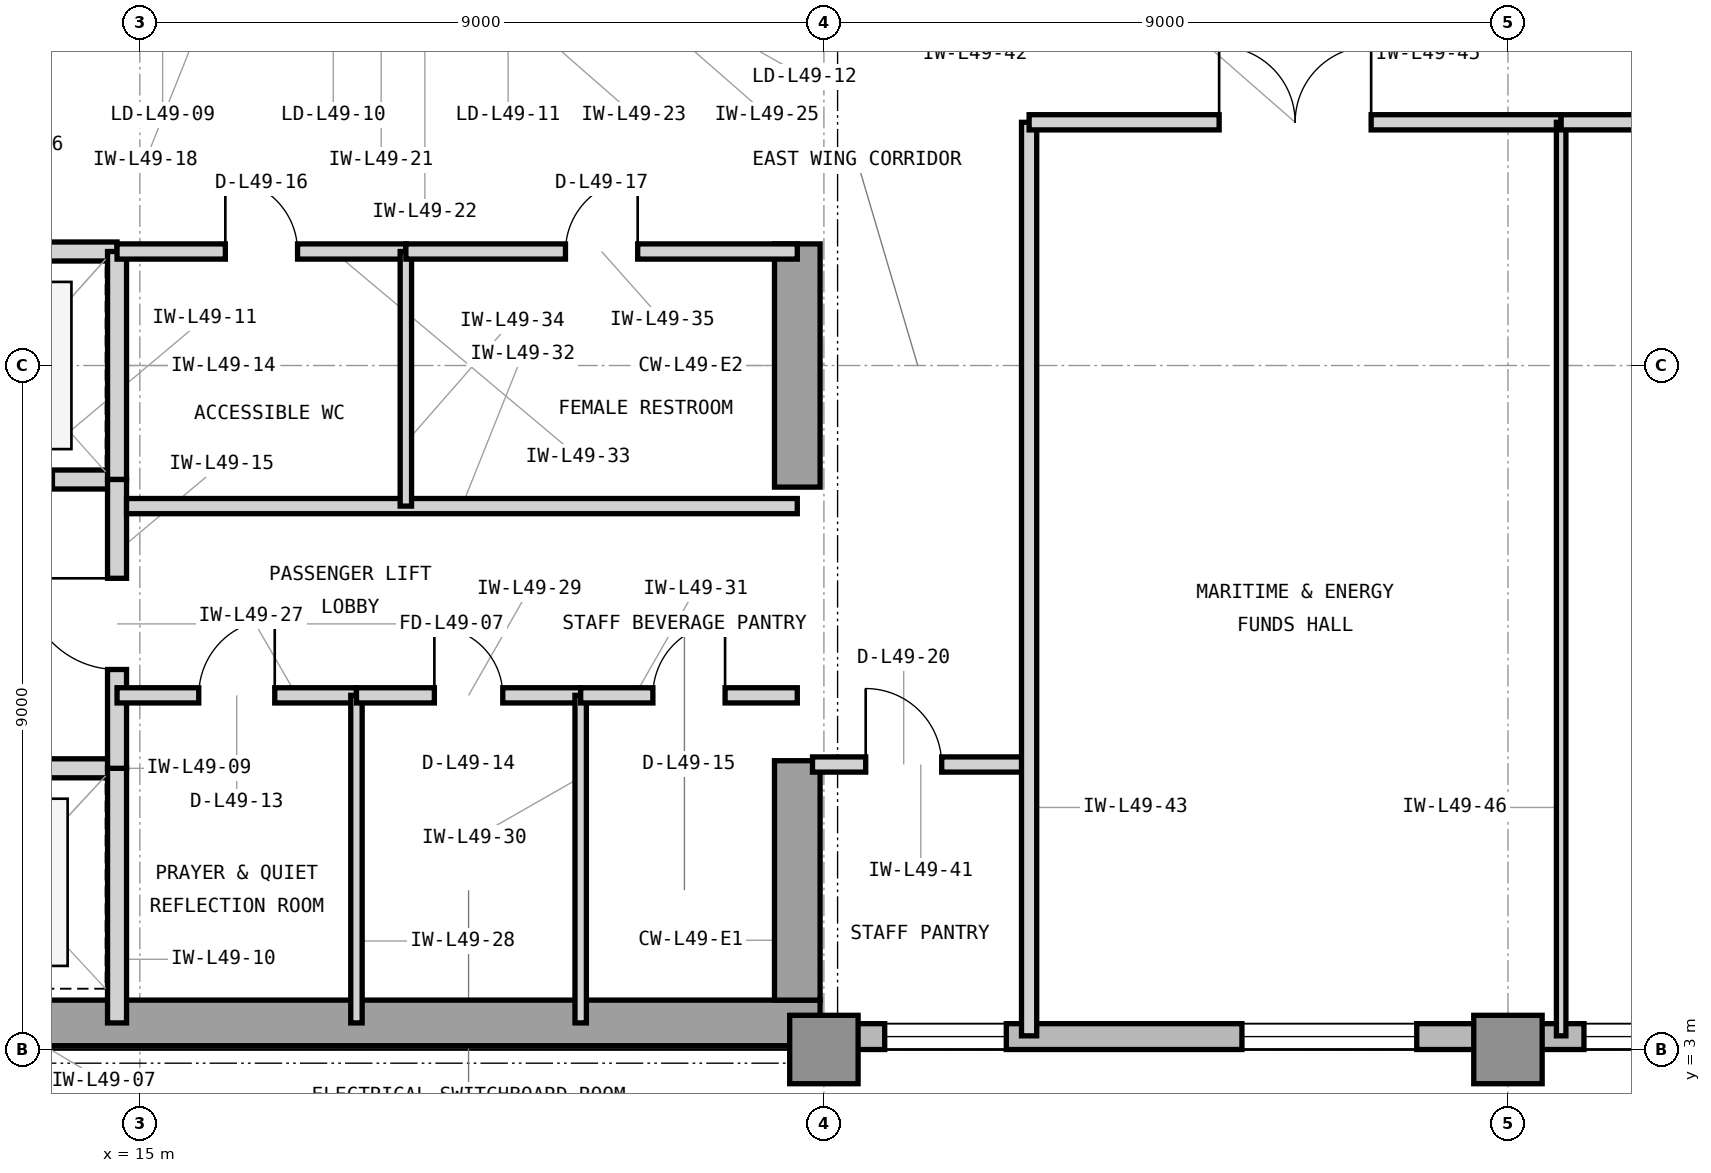
"""IFC4 building model, lengths in metres.
Left out: names, types, materials, properties, quantities, classifications, styles, units other than length and angle.
Written with IfcOpenShell. Run it as: python <this file> out.ifc"""

import sys

from ifc_helpers import new_model, si_unit, direction, frame, frame_2d, origin, origin_2d, place, context, subcontext, project, spatial, rectangle, extrude, element, fill, save


model = new_model("IFC4")
c1 = context("Model", 3, precision=1e-05, world=origin(), true_north=direction((0.0, 1.0)))
c2 = subcontext(c1, "Body", "Model", "MODEL_VIEW")
j1 = project(units=[si_unit("LENGTHUNIT", "METRE"), si_unit("PLANEANGLEUNIT", "RADIAN")], contexts=[c1])
p1 = place(None, origin())
s1 = spatial("IfcSite", under=j1, at=p1, CompositionType="ELEMENT")
p2 = place(p1, origin())
s2 = spatial("IfcBuilding", under=s1, at=p2, CompositionType="ELEMENT")
p3 = place(p2, frame((0.0, 0.0, 203.4)))
s3 = spatial("IfcBuildingStorey", under=s2, at=p3, CompositionType="ELEMENT", Elevation=203.4)
p4 = place(p3, frame((7.475, 3.35, 0.0), z_axis=(0.0, 0.0, 1.0), x_axis=(1.0, 0.0, 0.0)))
e1 = element("IfcWall", 1, at=p4, inside=s3, PredefinedType="SHEAR", context=c2, shape_type="SweptSolid", body=[
    extrude(rectangle(XDim=16.475, YDim=0.6, at=frame_2d((8.237, 0.0))), origin(), (0.0, 0.0, 1.0), 3.9),
])
p5 = place(p3, frame((23.65, 3.65, 0.0), z_axis=(0.0, 0.0, 1.0), x_axis=(0.0, 1.0, 0.0)))
e2 = element("IfcWall", 2, at=p5, inside=s3, PredefinedType="SHEAR", context=c2, shape_type="SweptSolid", body=[
    extrude(rectangle(XDim=3.15, YDim=0.6, at=frame_2d((1.575, 0.0))), origin(), (0.0, 0.0, 1.0), 3.9),
])
p6 = place(p3, frame((23.65, 10.4, 0.0), z_axis=(0.0, 0.0, 1.0), x_axis=(0.0, 1.0, 0.0)))
e3 = element("IfcWall", 3, at=p6, inside=s3, PredefinedType="SHEAR", context=c2, shape_type="SweptSolid", body=[
    extrude(rectangle(XDim=3.2, YDim=0.6, at=frame_2d((1.6, 0.0))), origin(), (0.0, 0.0, 1.0), 3.9),
])
for number, where, z_axis, x_axis in (
    (4, (24.0, 3.0, 0.0), (0.0, 0.0, 1.0), (1.0, 0.0, 0.0)),
    (5, (33.0, 3.0, 0.0), (0.0, 0.0, 1.0), (1.0, 0.0, 0.0)),
):
    element("IfcColumn", number, at=place(p3, frame(where, z_axis=z_axis, x_axis=x_axis)), inside=s3, PredefinedType="COLUMN", context=c2, shape_type="SweptSolid", body=[
        extrude(rectangle(XDim=0.9, YDim=0.9, at=origin_2d()), origin(), (0.0, 0.0, 1.0), 3.9),
    ])
p7 = place(p3, frame((23.9, 3.17, 0.0), z_axis=(0.0, 0.0, 1.0), x_axis=(1.0, 0.0, 0.0)))
e6 = element("IfcWall", 6, at=p7, inside=s3, PredefinedType="STANDARD", context=c2, shape_type="SweptSolid", body=[
    extrude(rectangle(XDim=31.5, YDim=0.34, at=frame_2d((15.75, 0.0))), origin(), (0.0, 0.0, 1.0), 3.7),
])
p8 = place(p7, frame((5.6, 0.0, 0.9)))
e7 = element("IfcOpeningElement", 7, at=p8, cuts=e6, PredefinedType="OPENING", context=c2, shape_type="SweptSolid", body=[
    extrude(rectangle(XDim=2.3, YDim=2.2, at=frame_2d((1.15, 1.1))), frame((0.0, 0.18, 0.0), z_axis=(0.0, -1.0, 0.0), x_axis=(1.0, 0.0, 0.0)), (0.0, 0.0, 1.0), 0.36),
])
p9 = place(p7, frame((10.1, 0.0, 0.9)))
e8 = element("IfcOpeningElement", 8, at=p9, cuts=e6, PredefinedType="OPENING", context=c2, shape_type="SweptSolid", body=[
    extrude(rectangle(XDim=2.3, YDim=2.2, at=frame_2d((1.15, 1.1))), frame((0.0, 0.18, 0.0), z_axis=(0.0, -1.0, 0.0), x_axis=(1.0, 0.0, 0.0)), (0.0, 0.0, 1.0), 0.36),
])
p10 = place(p7, frame((19.1, 0.0, 0.9)))
e9 = element("IfcOpeningElement", 9, at=p10, cuts=e6, PredefinedType="OPENING", context=c2, shape_type="SweptSolid", body=[
    extrude(rectangle(XDim=2.3, YDim=2.2, at=frame_2d((1.15, 1.1))), frame((0.0, 0.18, 0.0), z_axis=(0.0, -1.0, 0.0), x_axis=(1.0, 0.0, 0.0)), (0.0, 0.0, 1.0), 0.36),
])
p11 = place(p7, frame((0.9, 0.0, 0.9)))
e10 = element("IfcOpeningElement", 10, at=p11, cuts=e6, PredefinedType="OPENING", context=c2, shape_type="SweptSolid", body=[
    extrude(rectangle(XDim=1.6, YDim=2.2, at=frame_2d((0.8, 1.1))), frame((0.0, 0.18, 0.0), z_axis=(0.0, -1.0, 0.0), x_axis=(1.0, 0.0, 0.0)), (0.0, 0.0, 1.0), 0.36),
])
p12 = place(p3, frame((11.82, 6.7, 0.0), z_axis=(0.0, 0.0, 1.0), x_axis=(1.0, 0.0, 0.0)))
e11 = element("IfcWall", 11, at=p12, inside=s3, PredefinedType="PARTITIONING", context=c2, shape_type="SweptSolid", body=[
    extrude(rectangle(XDim=2.88, YDim=0.25, at=frame_2d((1.44, 0.0))), origin(), (0.0, 0.0, 1.0), 3.283),
])
p13 = place(p12, frame((0.85, 0.0, 0.0)))
e12 = element("IfcOpeningElement", 12, at=p13, cuts=e11, PredefinedType="OPENING", context=c2, shape_type="SweptSolid", body=[
    extrude(rectangle(XDim=1.1, YDim=2.25, at=frame_2d((0.55, 1.125))), frame((0.0, 0.135, 0.0), z_axis=(0.0, -1.0, 0.0), x_axis=(1.0, 0.0, 0.0)), (0.0, 0.0, 1.0), 0.27),
])
p14 = place(p3, frame((14.7, 3.35, 0.0), z_axis=(0.0, 0.0, 1.0), x_axis=(0.0, 1.0, 0.0)))
e13 = element("IfcWall", 13, at=p14, inside=s3, PredefinedType="PARTITIONING", context=c2, shape_type="SweptSolid", body=[
    extrude(rectangle(XDim=3.35, YDim=0.25, at=frame_2d((1.675, 0.0))), origin(), (0.0, 0.0, 1.0), 3.69),
])
p15 = place(p3, frame((11.95, 10.5, 0.0), z_axis=(0.0, 0.0, 1.0), x_axis=(1.0, 0.0, 0.0)))
e14 = element("IfcWall", 14, at=p15, inside=s3, PredefinedType="PARTITIONING", context=c2, shape_type="SweptSolid", body=[
    extrude(rectangle(XDim=2.75, YDim=0.25, at=frame_2d((1.375, 0.0))), origin(), (0.0, 0.0, 1.0), 3.283),
])
p16 = place(p15, frame((0.8, 0.0, 0.0)))
e15 = element("IfcOpeningElement", 15, at=p16, cuts=e14, PredefinedType="OPENING", context=c2, shape_type="SweptSolid", body=[
    extrude(rectangle(XDim=1.1, YDim=2.25, at=frame_2d((0.55, 1.125))), frame((0.0, 0.135, 0.0), z_axis=(0.0, -1.0, 0.0), x_axis=(1.0, 0.0, 0.0)), (0.0, 0.0, 1.0), 0.27),
])
p17 = place(p3, frame((11.95, 13.5, 0.0), z_axis=(0.0, 0.0, 1.0), x_axis=(1.0, 0.0, 0.0)))
e16 = element("IfcWall", 16, at=p17, inside=s3, PredefinedType="PARTITIONING", context=c2, shape_type="SweptSolid", body=[
    extrude(rectangle(XDim=2.75, YDim=0.25, at=frame_2d((1.375, 0.0))), origin(), (0.0, 0.0, 1.0), 3.283),
])
p18 = place(p3, frame((14.7, 10.5, 0.0), z_axis=(0.0, 0.0, 1.0), x_axis=(0.0, 1.0, 0.0)))
e17 = element("IfcWall", 17, at=p18, inside=s3, PredefinedType="PARTITIONING", context=c2, shape_type="SweptSolid", body=[
    extrude(rectangle(XDim=3.0, YDim=0.25, at=frame_2d((1.5, 0.0))), origin(), (0.0, 0.0, 1.0), 3.69),
])
p19 = place(p3, frame((14.7, 6.7, 0.0), z_axis=(0.0, 0.0, 1.0), x_axis=(0.0, 1.0, 0.0)))
e18 = element("IfcWall", 18, at=p19, inside=s3, PredefinedType="PARTITIONING", context=c2, shape_type="SweptSolid", body=[
    extrude(rectangle(XDim=3.8, YDim=0.25, at=frame_2d((1.9, 0.0))), origin(), (0.0, 0.0, 1.0), 3.69),
])
p20 = place(p19, frame((1.3, 0.0, 0.0)))
e19 = element("IfcOpeningElement", 19, at=p20, cuts=e18, PredefinedType="OPENING", context=c2, shape_type="SweptSolid", body=[
    extrude(rectangle(XDim=1.2, YDim=2.2, at=frame_2d((0.6, 1.1))), frame((0.0, 0.135, 0.0), z_axis=(0.0, -1.0, 0.0), x_axis=(1.0, 0.0, 0.0)), (0.0, 0.0, 1.0), 0.27),
])
p21 = place(p3, frame((14.7, 7.66, 0.0), z_axis=(0.0, 0.0, 1.0), x_axis=(1.0, 0.0, 0.0)))
e20 = element("IfcWall", 20, at=p21, inside=s3, PredefinedType="PARTITIONING", context=c2, shape_type="SweptSolid", body=[
    extrude(rectangle(XDim=3.15, YDim=0.2, at=frame_2d((1.575, 0.0))), origin(), (0.0, 0.0, 1.0), 3.69),
])
p22 = place(p21, frame((1.075, 0.0, 0.0)))
e21 = element("IfcOpeningElement", 21, at=p22, cuts=e20, PredefinedType="OPENING", context=c2, shape_type="SweptSolid", body=[
    extrude(rectangle(XDim=1.0, YDim=2.15, at=frame_2d((0.5, 1.075))), frame((0.0, 0.11, 0.0), z_axis=(0.0, -1.0, 0.0), x_axis=(1.0, 0.0, 0.0)), (0.0, 0.0, 1.0), 0.22),
])
p23 = place(p3, frame((17.85, 3.35, 0.0), z_axis=(0.0, 0.0, 1.0), x_axis=(0.0, 1.0, 0.0)))
e22 = element("IfcWall", 22, at=p23, inside=s3, PredefinedType="PARTITIONING", context=c2, shape_type="SweptSolid", body=[
    extrude(rectangle(XDim=4.31, YDim=0.15, at=frame_2d((2.155, 0.0))), origin(), (0.0, 0.0, 1.0), 3.69),
])
p24 = place(p3, frame((17.85, 7.66, 0.0), z_axis=(0.0, 0.0, 1.0), x_axis=(1.0, 0.0, 0.0)))
e23 = element("IfcWall", 23, at=p24, inside=s3, PredefinedType="PARTITIONING", context=c2, shape_type="SweptSolid", body=[
    extrude(rectangle(XDim=2.95, YDim=0.2, at=frame_2d((1.475, 0.0))), origin(), (0.0, 0.0, 1.0), 3.69),
])
p25 = place(p24, frame((1.025, 0.0, 0.0)))
e24 = element("IfcOpeningElement", 24, at=p25, cuts=e23, PredefinedType="OPENING", context=c2, shape_type="SweptSolid", body=[
    extrude(rectangle(XDim=0.9, YDim=2.1, at=frame_2d((0.45, 1.05))), frame((0.0, 0.11, 0.0), z_axis=(0.0, -1.0, 0.0), x_axis=(1.0, 0.0, 0.0)), (0.0, 0.0, 1.0), 0.22),
])
p26 = place(p3, frame((20.8, 3.35, 0.0), z_axis=(0.0, 0.0, 1.0), x_axis=(0.0, 1.0, 0.0)))
e25 = element("IfcWall", 25, at=p26, inside=s3, PredefinedType="PARTITIONING", context=c2, shape_type="SweptSolid", body=[
    extrude(rectangle(XDim=4.31, YDim=0.15, at=frame_2d((2.155, 0.0))), origin(), (0.0, 0.0, 1.0), 3.69),
])
p27 = place(p3, frame((20.8, 7.66, 0.0), z_axis=(0.0, 0.0, 1.0), x_axis=(1.0, 0.0, 0.0)))
e26 = element("IfcWall", 26, at=p27, inside=s3, PredefinedType="PARTITIONING", context=c2, shape_type="SweptSolid", body=[
    extrude(rectangle(XDim=2.85, YDim=0.2, at=frame_2d((1.425, 0.0))), origin(), (0.0, 0.0, 1.0), 3.69),
])
p28 = place(p27, frame((0.95, 0.0, 0.0)))
e27 = element("IfcOpeningElement", 27, at=p28, cuts=e26, PredefinedType="OPENING", context=c2, shape_type="SweptSolid", body=[
    extrude(rectangle(XDim=0.95, YDim=2.1, at=frame_2d((0.475, 1.05))), frame((0.0, 0.11, 0.0), z_axis=(0.0, -1.0, 0.0), x_axis=(1.0, 0.0, 0.0)), (0.0, 0.0, 1.0), 0.22),
])
p29 = place(p3, frame((14.825, 10.15, 0.0), z_axis=(0.0, 0.0, 1.0), x_axis=(1.0, 0.0, 0.0)))
e28 = element("IfcWall", 28, at=p29, inside=s3, PredefinedType="PARTITIONING", context=c2, shape_type="SweptSolid", body=[
    extrude(rectangle(XDim=8.825, YDim=0.2, at=frame_2d((4.413, 0.0))), origin(), (0.0, 0.0, 1.0), 3.69),
])
p30 = place(p3, frame((14.7, 13.5, 0.0), z_axis=(0.0, 0.0, 1.0), x_axis=(1.0, 0.0, 0.0)))
e29 = element("IfcWall", 29, at=p30, inside=s3, PredefinedType="PARTITIONING", context=c2, shape_type="SweptSolid", body=[
    extrude(rectangle(XDim=3.8, YDim=0.2, at=frame_2d((1.9, 0.0))), origin(), (0.0, 0.0, 1.0), 3.283),
])
p31 = place(p30, frame((1.425, 0.0, 0.0)))
e30 = element("IfcOpeningElement", 30, at=p31, cuts=e29, PredefinedType="OPENING", context=c2, shape_type="SweptSolid", body=[
    extrude(rectangle(XDim=0.95, YDim=2.1, at=frame_2d((0.475, 1.05))), frame((0.0, 0.11, 0.0), z_axis=(0.0, -1.0, 0.0), x_axis=(1.0, 0.0, 0.0)), (0.0, 0.0, 1.0), 0.22),
])
p32 = place(p3, frame((18.5, 10.15, 0.0), z_axis=(0.0, 0.0, 1.0), x_axis=(0.0, 1.0, 0.0)))
e31 = element("IfcWall", 31, at=p32, inside=s3, PredefinedType="PARTITIONING", context=c2, shape_type="SweptSolid", body=[
    extrude(rectangle(XDim=3.35, YDim=0.15, at=frame_2d((1.675, 0.0))), origin(), (0.0, 0.0, 1.0), 3.69),
])
p33 = place(p3, frame((18.5, 13.5, 0.0), z_axis=(0.0, 0.0, 1.0), x_axis=(1.0, 0.0, 0.0)))
e32 = element("IfcWall", 32, at=p33, inside=s3, PredefinedType="PARTITIONING", context=c2, shape_type="SweptSolid", body=[
    extrude(rectangle(XDim=5.15, YDim=0.2, at=frame_2d((2.575, 0.0))), origin(), (0.0, 0.0, 1.0), 3.283),
])
p34 = place(p33, frame((2.1, 0.0, 0.0)))
e33 = element("IfcOpeningElement", 33, at=p34, cuts=e32, PredefinedType="OPENING", context=c2, shape_type="SweptSolid", body=[
    extrude(rectangle(XDim=0.95, YDim=2.1, at=frame_2d((0.475, 1.05))), frame((0.0, 0.11, 0.0), z_axis=(0.0, -1.0, 0.0), x_axis=(1.0, 0.0, 0.0)), (0.0, 0.0, 1.0), 0.22),
])
p35 = place(p3, frame((23.85, 6.75, 0.0), z_axis=(0.0, 0.0, 1.0), x_axis=(1.0, 0.0, 0.0)))
e34 = element("IfcWall", 34, at=p35, inside=s3, PredefinedType="PARTITIONING", context=c2, shape_type="SweptSolid", body=[
    extrude(rectangle(XDim=2.85, YDim=0.2, at=frame_2d((1.425, 0.0))), origin(), (0.0, 0.0, 1.0), 3.69),
])
p36 = place(p35, frame((0.7, 0.0, 0.0)))
e35 = element("IfcOpeningElement", 35, at=p36, cuts=e34, PredefinedType="OPENING", context=c2, shape_type="SweptSolid", body=[
    extrude(rectangle(XDim=1.0, YDim=2.15, at=frame_2d((0.5, 1.075))), frame((0.0, 0.11, 0.0), z_axis=(0.0, -1.0, 0.0), x_axis=(1.0, 0.0, 0.0)), (0.0, 0.0, 1.0), 0.22),
])
p37 = place(p3, frame((26.7, 3.18, 0.0), z_axis=(0.0, 0.0, 1.0), x_axis=(0.0, 1.0, 0.0)))
e36 = element("IfcWall", 36, at=p37, inside=s3, PredefinedType="PARTITIONING", context=c2, shape_type="SweptSolid", body=[
    extrude(rectangle(XDim=12.02, YDim=0.2, at=frame_2d((6.01, 0.0))), origin(), (0.0, 0.0, 1.0), 3.69),
])
p38 = place(p3, frame((26.7, 15.2, 0.0), z_axis=(0.0, 0.0, 1.0), x_axis=(1.0, 0.0, 0.0)))
e37 = element("IfcWall", 37, at=p38, inside=s3, PredefinedType="PARTITIONING", context=c2, shape_type="SweptSolid", body=[
    extrude(rectangle(XDim=7.0, YDim=0.2, at=frame_2d((3.5, 0.0))), origin(), (0.0, 0.0, 1.0), 3.69),
])
p39 = place(p38, frame((2.5, 0.0, 0.0)))
e38 = element("IfcOpeningElement", 38, at=p39, cuts=e37, PredefinedType="OPENING", context=c2, shape_type="SweptSolid", body=[
    extrude(rectangle(XDim=2.0, YDim=2.5, at=frame_2d((1.0, 1.25))), frame((0.0, 0.11, 0.0), z_axis=(0.0, -1.0, 0.0), x_axis=(1.0, 0.0, 0.0)), (0.0, 0.0, 1.0), 0.22),
])
p40 = place(p3, frame((33.7, 3.18, 0.0), z_axis=(0.0, 0.0, 1.0), x_axis=(0.0, 1.0, 0.0)))
e39 = element("IfcWall", 39, at=p40, inside=s3, PredefinedType="PARTITIONING", context=c2, shape_type="SweptSolid", body=[
    extrude(rectangle(XDim=12.02, YDim=0.125, at=frame_2d((6.01, 0.0))), origin(), (0.0, 0.0, 1.0), 3.69),
])
p41 = place(p3, frame((33.7, 15.2, 0.0), z_axis=(0.0, 0.0, 1.0), x_axis=(1.0, 0.0, 0.0)))
e40 = element("IfcWall", 40, at=p41, inside=s3, PredefinedType="PARTITIONING", context=c2, shape_type="SweptSolid", body=[
    extrude(rectangle(XDim=7.0, YDim=0.2, at=frame_2d((3.5, 0.0))), origin(), (0.0, 0.0, 1.0), 3.69),
])
p42 = place(p41, frame((3.0, 0.0, 0.0)))
e41 = element("IfcOpeningElement", 41, at=p42, cuts=e40, PredefinedType="OPENING", context=c2, shape_type="SweptSolid", body=[
    extrude(rectangle(XDim=1.0, YDim=2.15, at=frame_2d((0.5, 1.075))), frame((0.0, 0.11, 0.0), z_axis=(0.0, -1.0, 0.0), x_axis=(1.0, 0.0, 0.0)), (0.0, 0.0, 1.0), 0.22),
])
p43 = place(p8, origin())
e42 = element("IfcWindow", 42, at=p43, inside=s3, PartitioningType="SINGLE_PANEL", PredefinedType="WINDOW", context=c2, shape_type="SweptSolid", body=[
    extrude(rectangle(XDim=2.3, YDim=2.2, at=frame_2d((1.15, 1.1))), frame((0.0, 0.11, 0.0), z_axis=(0.0, -1.0, 0.0), x_axis=(1.0, 0.0, 0.0)), (0.0, 0.0, 1.0), 0.06),
])
fill(e7, e42)
p44 = place(p9, origin())
e43 = element("IfcWindow", 43, at=p44, inside=s3, PartitioningType="SINGLE_PANEL", PredefinedType="WINDOW", context=c2, shape_type="SweptSolid", body=[
    extrude(rectangle(XDim=2.3, YDim=2.2, at=frame_2d((1.15, 1.1))), frame((0.0, 0.11, 0.0), z_axis=(0.0, -1.0, 0.0), x_axis=(1.0, 0.0, 0.0)), (0.0, 0.0, 1.0), 0.06),
])
fill(e8, e43)
p45 = place(p20, origin())
e44 = element("IfcDoor", 44, at=p45, inside=s3, OperationType="SINGLE_SWING_RIGHT", PredefinedType="DOOR", context=c2, shape_type="SweptSolid", body=[
    extrude(rectangle(XDim=1.2, YDim=2.2, at=frame_2d((0.6, 1.1))), frame((0.0, 0.025, 0.0), z_axis=(0.0, -1.0, 0.0), x_axis=(1.0, 0.0, 0.0)), (0.0, 0.0, 1.0), 0.05),
])
fill(e19, e44)
p46 = place(p22, origin())
e45 = element("IfcDoor", 45, at=p46, inside=s3, OperationType="SINGLE_SWING_RIGHT", PredefinedType="DOOR", context=c2, shape_type="SweptSolid", body=[
    extrude(rectangle(XDim=1.0, YDim=2.15, at=frame_2d((0.5, 1.075))), frame((0.0, 0.025, 0.0), z_axis=(0.0, -1.0, 0.0), x_axis=(1.0, 0.0, 0.0)), (0.0, 0.0, 1.0), 0.05),
])
fill(e21, e45)
p47 = place(p25, origin())
e46 = element("IfcDoor", 46, at=p47, inside=s3, OperationType="SINGLE_SWING_LEFT", PredefinedType="TRAPDOOR", context=c2, shape_type="SweptSolid", body=[
    extrude(rectangle(XDim=0.9, YDim=2.1, at=frame_2d((0.45, 1.05))), frame((0.0, 0.025, 0.0), z_axis=(0.0, -1.0, 0.0), x_axis=(1.0, 0.0, 0.0)), (0.0, 0.0, 1.0), 0.05),
])
fill(e24, e46)
p48 = place(p28, origin())
e47 = element("IfcDoor", 47, at=p48, inside=s3, OperationType="SINGLE_SWING_RIGHT", PredefinedType="DOOR", context=c2, shape_type="SweptSolid", body=[
    extrude(rectangle(XDim=0.95, YDim=2.1, at=frame_2d((0.475, 1.05))), frame((0.0, 0.025, 0.0), z_axis=(0.0, -1.0, 0.0), x_axis=(1.0, 0.0, 0.0)), (0.0, 0.0, 1.0), 0.05),
])
fill(e27, e47)
p49 = place(p31, origin())
e48 = element("IfcDoor", 48, at=p49, inside=s3, OperationType="SINGLE_SWING_LEFT", PredefinedType="DOOR", context=c2, shape_type="SweptSolid", body=[
    extrude(rectangle(XDim=0.95, YDim=2.1, at=frame_2d((0.475, 1.05))), frame((0.0, 0.025, 0.0), z_axis=(0.0, -1.0, 0.0), x_axis=(1.0, 0.0, 0.0)), (0.0, 0.0, 1.0), 0.05),
])
fill(e30, e48)
p50 = place(p34, origin())
e49 = element("IfcDoor", 49, at=p50, inside=s3, OperationType="SINGLE_SWING_RIGHT", PredefinedType="DOOR", context=c2, shape_type="SweptSolid", body=[
    extrude(rectangle(XDim=0.95, YDim=2.1, at=frame_2d((0.475, 1.05))), frame((0.0, 0.025, 0.0), z_axis=(0.0, -1.0, 0.0), x_axis=(1.0, 0.0, 0.0)), (0.0, 0.0, 1.0), 0.05),
])
fill(e33, e49)
p51 = place(p36, origin())
e50 = element("IfcDoor", 50, at=p51, inside=s3, OperationType="SINGLE_SWING_LEFT", PredefinedType="DOOR", context=c2, shape_type="SweptSolid", body=[
    extrude(rectangle(XDim=1.0, YDim=2.15, at=frame_2d((0.5, 1.075))), frame((0.0, 0.025, 0.0), z_axis=(0.0, -1.0, 0.0), x_axis=(1.0, 0.0, 0.0)), (0.0, 0.0, 1.0), 0.05),
])
fill(e35, e50)
p52 = place(p39, origin())
e51 = element("IfcDoor", 51, at=p52, inside=s3, OperationType="DOUBLE_DOOR_SINGLE_SWING", PredefinedType="DOOR", context=c2, shape_type="SweptSolid", body=[
    extrude(rectangle(XDim=2.0, YDim=2.5, at=frame_2d((1.0, 1.25))), frame((0.0, 0.025, 0.0), z_axis=(0.0, -1.0, 0.0), x_axis=(1.0, 0.0, 0.0)), (0.0, 0.0, 1.0), 0.05),
])
fill(e38, e51)
p53 = place(p11, origin())
e52 = element("IfcWindow", 52, at=p53, inside=s3, PartitioningType="SINGLE_PANEL", PredefinedType="WINDOW", context=c2, shape_type="SweptSolid", body=[
    extrude(rectangle(XDim=1.6, YDim=2.2, at=frame_2d((0.8, 1.1))), frame((0.0, 0.11, 0.0), z_axis=(0.0, -1.0, 0.0), x_axis=(1.0, 0.0, 0.0)), (0.0, 0.0, 1.0), 0.06),
])
fill(e10, e52)
save(model, sys.argv[1])
